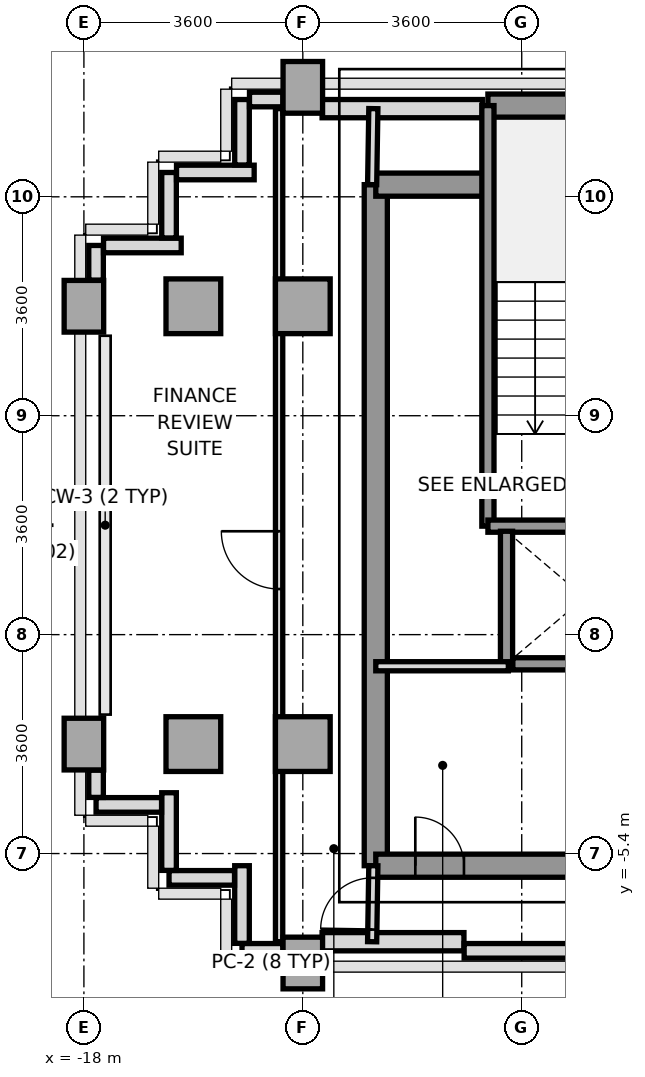
"""IFC4 building model, lengths in metres.
Left out: names, types, materials, properties, quantities, classifications, styles, units other than length and angle.
Written with IfcOpenShell. Run it as: python <this file> out.ifc"""

import sys

from ifc_helpers import new_model, si_unit, direction, frame, frame_2d, origin, origin_2d, place, context, subcontext, project, spatial, rectangle, extrude, source, transform, mapped, element, fill, save


model = new_model("IFC4")
c1 = context("Model", 3, precision=1e-05, world=origin(), true_north=direction((0.0, 1.0)))
c2 = subcontext(c1, "Body", "Model", "MODEL_VIEW")
j1 = project(units=[si_unit("LENGTHUNIT", "METRE"), si_unit("PLANEANGLEUNIT", "RADIAN")], contexts=[c1])
p1 = place(None, origin())
s1 = spatial("IfcSite", under=j1, at=p1, CompositionType="ELEMENT")
p2 = place(p1, origin())
s2 = spatial("IfcBuilding", under=s1, at=p2, CompositionType="ELEMENT")
p3 = place(p2, frame((0.0, 0.0, 180.8)))
s3 = spatial("IfcBuildingStorey", under=s2, at=p3, CompositionType="ELEMENT", Elevation=180.8)
m1 = source(origin(), c2, "Body", "SweptSolid", [
    extrude(rectangle(XDim=0.65, YDim=0.85, at=origin_2d()), origin(), (0.0, 0.0, 1.0), 3.2),
])
for number, where, z_axis, x_axis in (
    (1, (-18.0, -3.6, 0.0), (0.0, 0.0, 1.0), (1.0, 0.0, 0.0)),
    (2, (-18.0, 3.6, 0.0), (0.0, 0.0, 1.0), (1.0, 0.0, 0.0)),
):
    element("IfcColumn", number, at=place(p3, frame(where, z_axis=z_axis, x_axis=x_axis)), inside=s3, PredefinedType="COLUMN", context=c2, shape_type="MappedRepresentation", body=[
        mapped(m1, transform((0.0, 0.0, 0.0), x_axis=(1.0, 0.0, 0.0), y_axis=(0.0, 1.0, 0.0), z_axis=(0.0, 0.0, 1.0), scale=1.0)),
    ])
m2 = source(origin(), c2, "Body", "SweptSolid", [
    extrude(rectangle(XDim=0.9, YDim=0.9, at=origin_2d()), origin(), (0.0, 0.0, 1.0), 3.2),
])
for number, where, z_axis, x_axis in (
    (3, (-16.2, -3.6, 0.0), (0.0, 0.0, 1.0), (1.0, 0.0, 0.0)),
    (4, (-16.2, 3.6, 0.0), (0.0, 0.0, 1.0), (1.0, 0.0, 0.0)),
):
    element("IfcColumn", number, at=place(p3, frame(where, z_axis=z_axis, x_axis=x_axis)), inside=s3, PredefinedType="COLUMN", context=c2, shape_type="MappedRepresentation", body=[
        mapped(m2, transform((0.0, 0.0, 0.0), x_axis=(1.0, 0.0, 0.0), y_axis=(0.0, 1.0, 0.0), z_axis=(0.0, 0.0, 1.0), scale=1.0)),
    ])
p4 = place(p3, frame((-14.4, -7.2, 0.0), z_axis=(0.0, 0.0, 1.0), x_axis=(1.0, 0.0, 0.0)))
e5 = element("IfcColumn", 5, at=p4, inside=s3, PredefinedType="COLUMN", context=c2, shape_type="MappedRepresentation", body=[
    mapped(m1, transform((0.0, 0.0, 0.0), x_axis=(1.0, 0.0, 0.0), y_axis=(0.0, 1.0, 0.0), z_axis=(0.0, 0.0, 1.0), scale=1.0)),
])
for number, where, z_axis, x_axis in (
    (6, (-14.4, -3.6, 0.0), (0.0, 0.0, 1.0), (1.0, 0.0, 0.0)),
    (7, (-14.4, 3.6, 0.0), (0.0, 0.0, 1.0), (1.0, 0.0, 0.0)),
):
    element("IfcColumn", number, at=place(p3, frame(where, z_axis=z_axis, x_axis=x_axis)), inside=s3, PredefinedType="COLUMN", context=c2, shape_type="MappedRepresentation", body=[
        mapped(m2, transform((0.0, 0.0, 0.0), x_axis=(1.0, 0.0, 0.0), y_axis=(0.0, 1.0, 0.0), z_axis=(0.0, 0.0, 1.0), scale=1.0)),
    ])
p5 = place(p3, frame((-14.4, 7.2, 0.0), z_axis=(0.0, 0.0, 1.0), x_axis=(1.0, 0.0, 0.0)))
e8 = element("IfcColumn", 8, at=p5, inside=s3, PredefinedType="COLUMN", context=c2, shape_type="MappedRepresentation", body=[
    mapped(m1, transform((0.0, 0.0, 0.0), x_axis=(1.0, 0.0, 0.0), y_axis=(0.0, 1.0, 0.0), z_axis=(0.0, 0.0, 1.0), scale=1.0)),
])
p6 = place(p3, frame((-14.083, 6.85, 0.0), z_axis=(0.0, 0.0, 1.0), x_axis=(1.0, 0.0, 0.0)))
e9 = element("IfcWall", 9, at=p6, inside=s3, PredefinedType="SOLIDWALL", context=c2, shape_type="SweptSolid", body=[
    extrude(rectangle(XDim=2.635, YDim=0.3, at=frame_2d((1.317, 0.0))), origin(), (0.0, 0.0, 1.0), 3.2),
])
p7 = place(p3, frame((-14.083, -6.85, 0.0), z_axis=(0.0, 0.0, 1.0), x_axis=(1.0, 0.0, 0.0)))
e10 = element("IfcWall", 10, at=p7, inside=s3, PredefinedType="SOLIDWALL", context=c2, shape_type="SweptSolid", body=[
    extrude(rectangle(XDim=2.333, YDim=0.3, at=frame_2d((1.167, 0.0))), origin(), (0.0, 0.0, 1.0), 3.2),
])
p8 = place(p3, frame((-9.523, -7.0, 0.0), z_axis=(0.0, 0.0, 1.0), x_axis=(-1.0, 0.0, 0.0)))
e11 = element("IfcWall", 11, at=p8, inside=s3, PredefinedType="PARAPET", context=c2, shape_type="SweptSolid", body=[
    extrude(rectangle(XDim=2.224, YDim=0.24, at=frame_2d((1.112, 0.0))), origin(), (0.0, 0.0, 1.0), 1.15),
])
p9 = place(p3, frame((-14.728, -7.0, 0.0), z_axis=(0.0, 0.0, 1.0), x_axis=(-1.0, 0.0, 0.0)))
e12 = element("IfcWall", 12, at=p9, inside=s3, PredefinedType="PARAPET", context=c2, shape_type="SweptSolid", body=[
    extrude(rectangle(XDim=0.672, YDim=0.24, at=frame_2d((0.336, 0.0))), origin(), (0.0, 0.0, 1.0), 1.15),
])
p10 = place(p3, frame((-15.4, -6.877, 0.0), z_axis=(0.0, 0.0, 1.0), x_axis=(0.0, 1.0, 0.0)))
e13 = element("IfcWall", 13, at=p10, inside=s3, PredefinedType="PARAPET", context=c2, shape_type="SweptSolid", body=[
    extrude(rectangle(XDim=1.277, YDim=0.24, at=frame_2d((0.638, 0.0))), origin(), (0.0, 0.0, 1.0), 1.15),
])
p11 = place(p3, frame((-15.523, -5.8, 0.0), z_axis=(0.0, 0.0, 1.0), x_axis=(-1.0, 0.0, 0.0)))
e14 = element("IfcWall", 14, at=p11, inside=s3, PredefinedType="PARAPET", context=c2, shape_type="SweptSolid", body=[
    extrude(rectangle(XDim=1.077, YDim=0.24, at=frame_2d((0.539, 0.0))), origin(), (0.0, 0.0, 1.0), 1.15),
])
p12 = place(p3, frame((-16.6, -5.677, 0.0), z_axis=(0.0, 0.0, 1.0), x_axis=(0.0, 1.0, 0.0)))
e15 = element("IfcWall", 15, at=p12, inside=s3, PredefinedType="PARAPET", context=c2, shape_type="SweptSolid", body=[
    extrude(rectangle(XDim=1.277, YDim=0.24, at=frame_2d((0.639, 0.0))), origin(), (0.0, 0.0, 1.0), 1.15),
])
p13 = place(p3, frame((-16.723, -4.6, 0.0), z_axis=(0.0, 0.0, 1.0), x_axis=(-1.0, 0.0, 0.0)))
e16 = element("IfcWall", 16, at=p13, inside=s3, PredefinedType="PARAPET", context=c2, shape_type="SweptSolid", body=[
    extrude(rectangle(XDim=1.077, YDim=0.24, at=frame_2d((0.539, 0.0))), origin(), (0.0, 0.0, 1.0), 1.15),
])
p14 = place(p3, frame((-17.8, -4.477, 0.0), z_axis=(0.0, 0.0, 1.0), x_axis=(0.0, 1.0, 0.0)))
e17 = element("IfcWall", 17, at=p14, inside=s3, PredefinedType="PARAPET", context=c2, shape_type="SweptSolid", body=[
    extrude(rectangle(XDim=0.449, YDim=0.24, at=frame_2d((0.225, 0.0))), origin(), (0.0, 0.0, 1.0), 1.15),
])
p15 = place(p3, frame((-17.8, 4.028, 0.0), z_axis=(0.0, 0.0, 1.0), x_axis=(0.0, 1.0, 0.0)))
e18 = element("IfcWall", 18, at=p15, inside=s3, PredefinedType="PARAPET", context=c2, shape_type="SweptSolid", body=[
    extrude(rectangle(XDim=0.572, YDim=0.24, at=frame_2d((0.286, 0.0))), origin(), (0.0, 0.0, 1.0), 1.15),
])
p16 = place(p3, frame((-17.677, 4.6, 0.0), z_axis=(0.0, 0.0, 1.0), x_axis=(1.0, 0.0, 0.0)))
e19 = element("IfcWall", 19, at=p16, inside=s3, PredefinedType="PARAPET", context=c2, shape_type="SweptSolid", body=[
    extrude(rectangle(XDim=1.277, YDim=0.24, at=frame_2d((0.639, 0.0))), origin(), (0.0, 0.0, 1.0), 1.15),
])
p17 = place(p3, frame((-16.6, 4.723, 0.0), z_axis=(0.0, 0.0, 1.0), x_axis=(0.0, 1.0, 0.0)))
e20 = element("IfcWall", 20, at=p17, inside=s3, PredefinedType="PARAPET", context=c2, shape_type="SweptSolid", body=[
    extrude(rectangle(XDim=1.077, YDim=0.24, at=frame_2d((0.539, 0.0))), origin(), (0.0, 0.0, 1.0), 1.15),
])
p18 = place(p3, frame((-16.477, 5.8, 0.0), z_axis=(0.0, 0.0, 1.0), x_axis=(1.0, 0.0, 0.0)))
e21 = element("IfcWall", 21, at=p18, inside=s3, PredefinedType="PARAPET", context=c2, shape_type="SweptSolid", body=[
    extrude(rectangle(XDim=1.277, YDim=0.24, at=frame_2d((0.639, 0.0))), origin(), (0.0, 0.0, 1.0), 1.15),
])
p19 = place(p3, frame((-15.4, 5.923, 0.0), z_axis=(0.0, 0.0, 1.0), x_axis=(0.0, 1.0, 0.0)))
e22 = element("IfcWall", 22, at=p19, inside=s3, PredefinedType="PARAPET", context=c2, shape_type="SweptSolid", body=[
    extrude(rectangle(XDim=1.077, YDim=0.24, at=frame_2d((0.539, 0.0))), origin(), (0.0, 0.0, 1.0), 1.15),
])
p20 = place(p3, frame((-15.277, 7.0, 0.0), z_axis=(0.0, 0.0, 1.0), x_axis=(1.0, 0.0, 0.0)))
e23 = element("IfcWall", 23, at=p20, inside=s3, PredefinedType="PARAPET", context=c2, shape_type="SweptSolid", body=[
    extrude(rectangle(XDim=0.549, YDim=0.24, at=frame_2d((0.274, 0.0))), origin(), (0.0, 0.0, 1.0), 1.15),
])
p21 = place(p3, frame((-13.2, -5.6, 0.0), z_axis=(0.0, 0.0, 1.0), x_axis=(0.0, 1.0, 0.0)))
e24 = element("IfcWall", 24, at=p21, inside=s3, PredefinedType="SHEAR", context=c2, shape_type="SweptSolid", body=[
    extrude(rectangle(XDim=11.2, YDim=0.38, at=frame_2d((5.6, 0.0))), origin(), (0.0, 0.0, 1.0), 3.2),
])
p22 = place(p3, frame((-11.356, 6.9, 0.0), z_axis=(0.0, 0.0, 1.0), x_axis=(1.0, 0.0, 0.0)))
e25 = element("IfcWall", 25, at=p22, inside=s3, PredefinedType="SHEAR", context=c2, shape_type="SweptSolid", body=[
    extrude(rectangle(XDim=5.956, YDim=0.38, at=frame_2d((2.978, 0.0))), origin(), (0.0, 0.0, 1.0), 3.2),
])
p23 = place(p3, frame((-13.2, 5.6, 0.0), z_axis=(0.0, 0.0, 1.0), x_axis=(1.0, 0.0, 0.0)))
e26 = element("IfcWall", 26, at=p23, inside=s3, PredefinedType="SHEAR", context=c2, shape_type="SweptSolid", body=[
    extrude(rectangle(XDim=1.844, YDim=0.38, at=frame_2d((0.922, 0.0))), origin(), (0.0, 0.0, 1.0), 3.2),
])
p24 = place(p3, frame((-13.2, -5.6, 0.0), z_axis=(0.0, 0.0, 1.0), x_axis=(1.0, 0.0, 0.0)))
e27 = element("IfcWall", 27, at=p24, inside=s3, PredefinedType="SHEAR", context=c2, shape_type="SweptSolid", body=[
    extrude(rectangle(XDim=7.8, YDim=0.38, at=frame_2d((3.9, 0.0))), origin(), (0.0, 0.0, 1.0), 3.2),
])
p25 = place(p24, frame((0.65, 0.0, 0.0)))
e28 = element("IfcOpeningElement", 28, at=p25, cuts=e27, PredefinedType="OPENING", context=c2, shape_type="SweptSolid", body=[
    extrude(rectangle(XDim=0.8, YDim=2.1, at=frame_2d((0.4, 1.05))), frame((0.0, 0.2, 0.0), z_axis=(0.0, -1.0, 0.0), x_axis=(1.0, 0.0, 0.0)), (0.0, 0.0, 1.0), 0.4),
])
p26 = place(p3, frame((-11.356, -0.016, 0.0), z_axis=(0.0, 0.0, 1.0), x_axis=(0.0, 1.0, 0.0)))
e29 = element("IfcWall", 29, at=p26, inside=s3, PredefinedType="SOLIDWALL", context=c2, shape_type="SweptSolid", body=[
    extrude(rectangle(XDim=6.916, YDim=0.2, at=frame_2d((3.458, 0.0))), origin(), (0.0, 0.0, 1.0), 3.2),
])
p27 = place(p3, frame((-11.356, -0.016, 0.0), z_axis=(0.0, 0.0, 1.0), x_axis=(1.0, 0.0, 0.0)))
e30 = element("IfcWall", 30, at=p27, inside=s3, PredefinedType="SOLIDWALL", context=c2, shape_type="SweptSolid", body=[
    extrude(rectangle(XDim=3.152, YDim=0.2, at=frame_2d((1.576, 0.0))), origin(), (0.0, 0.0, 1.0), 3.2),
])
p28 = place(p3, frame((-11.05, -2.28, 0.0), z_axis=(0.0, 0.0, 1.0), x_axis=(0.0, 1.0, 0.0)))
e31 = element("IfcWall", 31, at=p28, inside=s3, PredefinedType="SOLIDWALL", context=c2, shape_type="SweptSolid", body=[
    extrude(rectangle(XDim=2.18, YDim=0.2, at=frame_2d((1.09, 0.0))), origin(), (0.0, 0.0, 1.0), 3.2),
])
p29 = place(p3, frame((-10.946, -2.28, 0.0), z_axis=(0.0, 0.0, 1.0), x_axis=(1.0, 0.0, 0.0)))
e32 = element("IfcWall", 32, at=p29, inside=s3, PredefinedType="SOLIDWALL", context=c2, shape_type="SweptSolid", body=[
    extrude(rectangle(XDim=2.362, YDim=0.2, at=frame_2d((1.181, 0.0))), origin(), (0.0, 0.0, 1.0), 3.2),
])
p30 = place(p3, frame((-13.2, -2.32, 0.0), z_axis=(0.0, 0.0, 1.0), x_axis=(1.0, 0.0, 0.0)))
e33 = element("IfcWall", 33, at=p30, inside=s3, PredefinedType="PARTITIONING", context=c2, shape_type="SweptSolid", body=[
    extrude(rectangle(XDim=2.18, YDim=0.15, at=frame_2d((1.09, 0.0))), origin(), (0.0, 0.0, 1.0), 3.2),
])
p31 = place(p3, frame((-13.26, 5.6, 0.0), z_axis=(0.0, 0.0, 1.0), x_axis=(0.016013571389, 0.999871774545, 0.0)))
e34 = element("IfcWall", 34, at=p31, inside=s3, PredefinedType="PARTITIONING", context=c2, shape_type="SweptSolid", body=[
    extrude(rectangle(XDim=1.25, YDim=0.15, at=frame_2d((0.625, 0.0))), origin(), (0.0, 0.0, 1.0), 3.2),
])
p32 = place(p3, frame((-13.26, -6.85, 0.0), z_axis=(0.0, 0.0, 1.0), x_axis=(0.016013571389, 0.999871774545, 0.0)))
e35 = element("IfcWall", 35, at=p32, inside=s3, PredefinedType="PARTITIONING", context=c2, shape_type="SweptSolid", body=[
    extrude(rectangle(XDim=1.25, YDim=0.15, at=frame_2d((0.625, 0.0))), origin(), (0.0, 0.0, 1.0), 3.2),
])
p33 = place(p32, frame((0.2, 0.0, 0.0)))
e36 = element("IfcOpeningElement", 36, at=p33, cuts=e35, PredefinedType="OPENING", context=c2, shape_type="SweptSolid", body=[
    extrude(rectangle(XDim=0.85, YDim=2.1, at=frame_2d((0.425, 1.05))), frame((0.0, 0.085, 0.0), z_axis=(0.0, -1.0, 0.0), x_axis=(1.0, 0.0, 0.0)), (0.0, 0.0, 1.0), 0.17),
])
p34 = place(p3, frame((-14.79, -6.85, 0.0), z_axis=(0.0, 0.0, 1.0), x_axis=(0.0, 1.0, 0.0)))
e37 = element("IfcWall", 37, at=p34, inside=s3, PredefinedType="PARTITIONING", context=c2, shape_type="SweptSolid", body=[
    extrude(rectangle(XDim=13.7, YDim=0.12, at=frame_2d((6.85, 0.0))), origin(), (0.0, 0.0, 1.0), 3.2),
])
p35 = place(p34, frame((5.8, 0.0, 0.0)))
e38 = element("IfcOpeningElement", 38, at=p35, cuts=e37, PredefinedType="OPENING", context=c2, shape_type="SweptSolid", body=[
    extrude(rectangle(XDim=0.95, YDim=2.15, at=frame_2d((0.475, 1.075))), frame((0.0, 0.07, 0.0), z_axis=(0.0, -1.0, 0.0), x_axis=(1.0, 0.0, 0.0)), (0.0, 0.0, 1.0), 0.14),
])
m3 = source(origin(), c2, "Body", "SweptSolid", [
    extrude(rectangle(XDim=0.8, YDim=2.1, at=frame_2d((0.4, 1.05))), frame((0.0, 0.025, 0.0), z_axis=(0.0, -1.0, 0.0), x_axis=(1.0, 0.0, 0.0)), (0.0, 0.0, 1.0), 0.05),
])
p36 = place(p25, origin())
e39 = element("IfcDoor", 39, at=p36, inside=s3, OperationType="SINGLE_SWING_LEFT", PredefinedType="DOOR", context=c2, shape_type="MappedRepresentation", body=[
    mapped(m3, transform((0.0, 0.0, 0.0), x_axis=(1.0, 0.0, 0.0), y_axis=(0.0, 1.0, 0.0), z_axis=(0.0, 0.0, 1.0), scale=1.0)),
])
fill(e28, e39)
m4 = source(origin(), c2, "Body", "SweptSolid", [
    extrude(rectangle(XDim=0.85, YDim=2.1, at=frame_2d((0.425, 1.05))), frame((0.0, 0.025, 0.0), z_axis=(0.0, -1.0, 0.0), x_axis=(1.0, 0.0, 0.0)), (0.0, 0.0, 1.0), 0.05),
])
p37 = place(p33, origin())
e40 = element("IfcDoor", 40, at=p37, inside=s3, OperationType="SINGLE_SWING_LEFT", PredefinedType="DOOR", context=c2, shape_type="MappedRepresentation", body=[
    mapped(m4, transform((0.0, 0.0, 0.0), x_axis=(1.0, 0.0, 0.0), y_axis=(0.0, 1.0, 0.0), z_axis=(0.0, 0.0, 1.0), scale=1.0)),
])
fill(e36, e40)
m5 = source(origin(), c2, "Body", "SweptSolid", [
    extrude(rectangle(XDim=0.95, YDim=2.15, at=frame_2d((0.475, 1.075))), frame((0.0, 0.025, 0.0), z_axis=(0.0, -1.0, 0.0), x_axis=(1.0, 0.0, 0.0)), (0.0, 0.0, 1.0), 0.05),
])
p38 = place(p35, origin())
e41 = element("IfcDoor", 41, at=p38, inside=s3, OperationType="SINGLE_SWING_RIGHT", PredefinedType="DOOR", context=c2, shape_type="MappedRepresentation", body=[
    mapped(m5, transform((0.0, 0.0, 0.0), x_axis=(1.0, 0.0, 0.0), y_axis=(0.0, 1.0, 0.0), z_axis=(0.0, 0.0, 1.0), scale=1.0)),
])
fill(e38, e41)
save(model, sys.argv[1])
